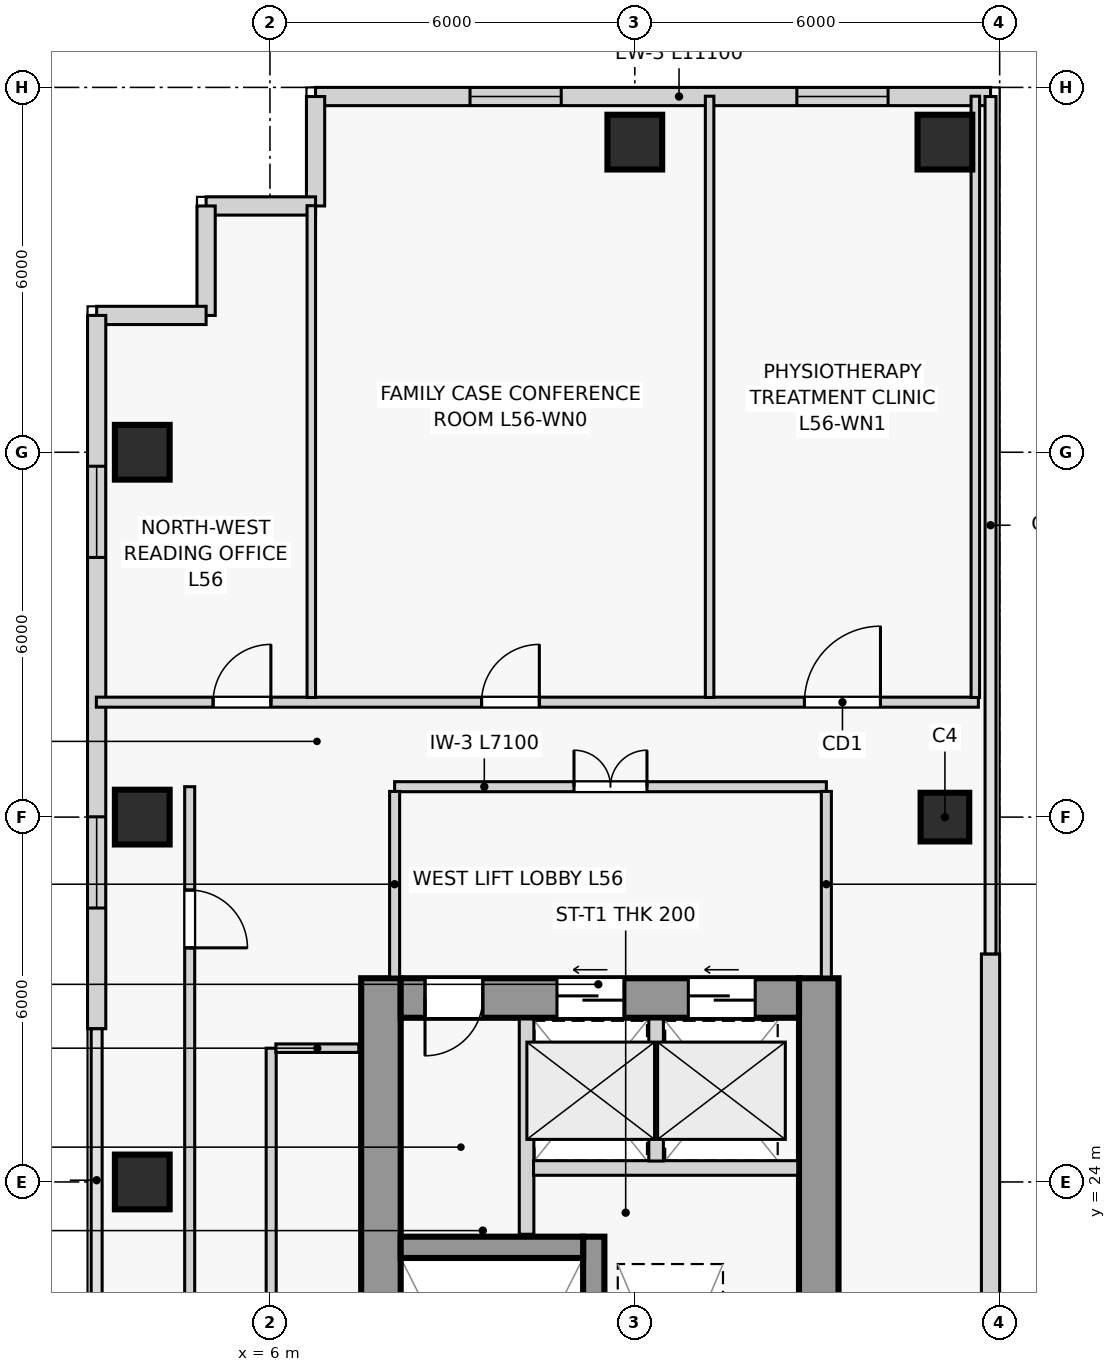
"""IFC4 building model, lengths in metres.
Left out: names, types, materials, properties, quantities, classifications, styles, units other than length and angle.
Written with IfcOpenShell. Run it as: python <this file> out.ifc"""

import sys

from ifc_helpers import new_model, si_unit, direction, frame, frame_2d, origin, origin_2d, place, context, subcontext, project, spatial, rectangle, extrude, source, transform, mapped, element, fill, save


model = new_model("IFC4")
c1 = context("Model", 3, precision=1e-05, world=origin(), true_north=direction((0.0, 1.0)))
c2 = subcontext(c1, "Body", "Model", "MODEL_VIEW")
j1 = project(units=[si_unit("LENGTHUNIT", "METRE"), si_unit("PLANEANGLEUNIT", "RADIAN")], contexts=[c1])
p1 = place(None, origin())
s1 = spatial("IfcSite", under=j1, at=p1, CompositionType="ELEMENT")
p2 = place(p1, origin())
s2 = spatial("IfcBuilding", under=s1, at=p2, CompositionType="ELEMENT")
p3 = place(p2, frame((0.0, 0.0, 213.3)))
s3 = spatial("IfcBuildingStorey", under=s2, at=p3, CompositionType="ELEMENT", Elevation=213.3)
p4 = place(p3, frame((7.825, 14.7, 0.0), z_axis=(0.0, 0.0, 1.0), x_axis=(0.0, 1.0, 0.0)))
e1 = element("IfcWall", 1, at=p4, inside=s3, PredefinedType="SHEAR", context=c2, shape_type="SweptSolid", body=[
    extrude(rectangle(XDim=12.65, YDim=0.65, at=frame_2d((6.325, 0.0))), origin(), (0.0, 0.0, 1.0), 3.6),
])
p5 = place(p3, frame((15.025, 14.7, 0.0), z_axis=(0.0, 0.0, 1.0), x_axis=(0.0, 1.0, 0.0)))
e2 = element("IfcWall", 2, at=p5, inside=s3, PredefinedType="SHEAR", context=c2, shape_type="SweptSolid", body=[
    extrude(rectangle(XDim=12.65, YDim=0.65, at=frame_2d((6.325, 0.0))), origin(), (0.0, 0.0, 1.0), 3.6),
])
p6 = place(p5, frame((5.4, 0.0, 0.0)))
e3 = element("IfcOpeningElement", 3, at=p6, cuts=e2, PredefinedType="OPENING", context=c2, shape_type="SweptSolid", body=[
    extrude(rectangle(XDim=1.1, YDim=2.2, at=frame_2d((0.55, 1.1))), frame((0.0, 0.335, 0.0), z_axis=(0.0, -1.0, 0.0), x_axis=(1.0, 0.0, 0.0)), (0.0, 0.0, 1.0), 0.67),
])
p7 = place(p3, frame((8.15, 27.025, 0.0), z_axis=(0.0, 0.0, 1.0), x_axis=(1.0, 0.0, 0.0)))
e4 = element("IfcWall", 4, at=p7, inside=s3, PredefinedType="SHEAR", context=c2, shape_type="SweptSolid", body=[
    extrude(rectangle(XDim=6.55, YDim=0.65, at=frame_2d((3.275, 0.0))), origin(), (0.0, 0.0, 1.0), 3.6),
])
p8 = place(p7, frame((0.4, 0.0, 0.0)))
e5 = element("IfcOpeningElement", 5, at=p8, cuts=e4, PredefinedType="OPENING", context=c2, shape_type="SweptSolid", body=[
    extrude(rectangle(XDim=0.95, YDim=2.1, at=frame_2d((0.475, 1.05))), frame((0.0, 0.335, 0.0), z_axis=(0.0, -1.0, 0.0), x_axis=(1.0, 0.0, 0.0)), (0.0, 0.0, 1.0), 0.67),
])
p9 = place(p7, frame((2.57, 0.0, 0.0)))
e6 = element("IfcOpeningElement", 6, at=p9, cuts=e4, PredefinedType="OPENING", context=c2, shape_type="SweptSolid", body=[
    extrude(rectangle(XDim=1.1, YDim=2.2, at=frame_2d((0.55, 1.1))), frame((0.0, 0.335, 0.0), z_axis=(0.0, -1.0, 0.0), x_axis=(1.0, 0.0, 0.0)), (0.0, 0.0, 1.0), 0.67),
])
p10 = place(p7, frame((4.73, 0.0, 0.0)))
e7 = element("IfcOpeningElement", 7, at=p10, cuts=e4, PredefinedType="OPENING", context=c2, shape_type="SweptSolid", body=[
    extrude(rectangle(XDim=1.1, YDim=2.2, at=frame_2d((0.55, 1.1))), frame((0.0, 0.335, 0.0), z_axis=(0.0, -1.0, 0.0), x_axis=(1.0, 0.0, 0.0)), (0.0, 0.0, 1.0), 0.67),
])
p11 = place(p3, frame((11.325, 15.35, 0.0), z_axis=(0.0, 0.0, 1.0), x_axis=(0.0, 1.0, 0.0)))
e8 = element("IfcWall", 8, at=p11, inside=s3, PredefinedType="SHEAR", context=c2, shape_type="SweptSolid", body=[
    extrude(rectangle(XDim=7.75, YDim=0.35, at=frame_2d((3.875, 0.0))), origin(), (0.0, 0.0, 1.0), 3.6),
])
p12 = place(p3, frame((8.15, 22.925, 0.0), z_axis=(0.0, 0.0, 1.0), x_axis=(1.0, 0.0, 0.0)))
e9 = element("IfcWall", 9, at=p12, inside=s3, PredefinedType="SHEAR", context=c2, shape_type="SweptSolid", body=[
    extrude(rectangle(XDim=3.0, YDim=0.35, at=frame_2d((1.5, 0.0))), origin(), (0.0, 0.0, 1.0), 3.6),
])
m1 = source(origin(), c2, "Body", "SweptSolid", [
    extrude(rectangle(XDim=0.9, YDim=0.9, at=origin_2d()), origin(), (0.0, 0.0, 1.0), 3.6),
])
for number, where, z_axis, x_axis in (
    (10, (12.0, 41.1, 0.0), (0.0, 0.0, 1.0), (1.0, 0.0, 0.0)),
    (11, (17.1, 41.1, 0.0), (0.0, 0.0, 1.0), (1.0, 0.0, 0.0)),
    (12, (3.9, 24.0, 0.0), (0.0, 0.0, 1.0), (1.0, 0.0, 0.0)),
    (13, (3.9, 30.0, 0.0), (0.0, 0.0, 1.0), (1.0, 0.0, 0.0)),
    (14, (3.9, 36.0, 0.0), (0.0, 0.0, 1.0), (1.0, 0.0, 0.0)),
):
    element("IfcColumn", number, at=place(p3, frame(where, z_axis=z_axis, x_axis=x_axis)), inside=s3, PredefinedType="COLUMN", context=c2, shape_type="MappedRepresentation", body=[
        mapped(m1, transform((0.0, 0.0, 0.0), scale=1.0)),
    ])
m2 = source(origin(), c2, "Body", "SweptSolid", [
    extrude(rectangle(XDim=0.8, YDim=0.8, at=origin_2d()), origin(), (0.0, 0.0, 1.0), 3.6),
])
p13 = place(p3, frame((17.1, 30.0, 0.0), z_axis=(0.0, 0.0, 1.0), x_axis=(1.0, 0.0, 0.0)))
e15 = element("IfcColumn", 15, at=p13, inside=s3, PredefinedType="COLUMN", context=c2, shape_type="MappedRepresentation", body=[
    mapped(m2, transform((0.0, 0.0, 0.0), scale=1.0)),
])
p14 = place(p3, frame((17.85, 14.25, 0.0), z_axis=(0.0, 0.0, 1.0), x_axis=(0.0, 1.0, 0.0)))
e16 = element("IfcWall", 16, at=p14, inside=s3, PredefinedType="SOLIDWALL", context=c2, shape_type="SweptSolid", body=[
    extrude(rectangle(XDim=13.5, YDim=0.3, at=frame_2d((6.75, 0.0))), origin(), (0.0, 0.0, 1.0), 2.95),
])
p15 = place(p3, frame((17.85, 41.85, 0.0), z_axis=(0.0, 0.0, 1.0), x_axis=(-1.0, 0.0, 0.0)))
e17 = element("IfcWall", 17, at=p15, inside=s3, PredefinedType="SOLIDWALL", context=c2, shape_type="SweptSolid", body=[
    extrude(rectangle(XDim=11.1, YDim=0.3, at=frame_2d((5.55, 0.0))), origin(), (0.0, 0.0, 1.0), 2.95),
])
p16 = place(p15, frame((1.685, 0.0, 0.85)))
e18 = element("IfcOpeningElement", 18, at=p16, cuts=e17, PredefinedType="OPENING", context=c2, shape_type="SweptSolid", body=[
    extrude(rectangle(XDim=1.5, YDim=1.8, at=frame_2d((0.75, 0.9))), frame((0.0, 0.16, 0.0), z_axis=(0.0, -1.0, 0.0), x_axis=(1.0, 0.0, 0.0)), (0.0, 0.0, 1.0), 0.32),
])
p17 = place(p15, frame((7.06, 0.0, 0.85)))
e19 = element("IfcOpeningElement", 19, at=p17, cuts=e17, PredefinedType="OPENING", context=c2, shape_type="SweptSolid", body=[
    extrude(rectangle(XDim=1.5, YDim=1.8, at=frame_2d((0.75, 0.9))), frame((0.0, 0.16, 0.0), z_axis=(0.0, -1.0, 0.0), x_axis=(1.0, 0.0, 0.0)), (0.0, 0.0, 1.0), 0.32),
])
for number, where, z_axis, x_axis in (
    (20, (6.75, 41.85, 0.0), (0.0, 0.0, 1.0), (0.0, -1.0, 0.0)),
    (21, (6.75, 40.05, 0.0), (0.0, 0.0, 1.0), (-1.0, 0.0, 0.0)),
    (22, (4.95, 40.05, 0.0), (0.0, 0.0, 1.0), (0.0, -1.0, 0.0)),
    (23, (4.95, 38.25, 0.0), (0.0, 0.0, 1.0), (-1.0, 0.0, 0.0)),
):
    element("IfcWall", number, at=place(p3, frame(where, z_axis=z_axis, x_axis=x_axis)), inside=s3, PredefinedType="SOLIDWALL", context=c2, shape_type="SweptSolid", body=[
        extrude(rectangle(XDim=1.8, YDim=0.3, at=frame_2d((0.9, 0.0))), origin(), (0.0, 0.0, 1.0), 2.95),
    ])
p18 = place(p3, frame((3.15, 38.25, 0.0), z_axis=(0.0, 0.0, 1.0), x_axis=(0.0, -1.0, 0.0)))
e24 = element("IfcWall", 24, at=p18, inside=s3, PredefinedType="SOLIDWALL", context=c2, shape_type="SweptSolid", body=[
    extrude(rectangle(XDim=11.73, YDim=0.3, at=frame_2d((5.865, 0.0))), origin(), (0.0, 0.0, 1.0), 2.95),
])
p19 = place(p18, frame((2.48, 0.0, 0.85)))
e25 = element("IfcOpeningElement", 25, at=p19, cuts=e24, PredefinedType="OPENING", context=c2, shape_type="SweptSolid", body=[
    extrude(rectangle(XDim=1.5, YDim=1.8, at=frame_2d((0.75, 0.9))), frame((0.0, 0.16, 0.0), z_axis=(0.0, -1.0, 0.0), x_axis=(1.0, 0.0, 0.0)), (0.0, 0.0, 1.0), 0.32),
])
p20 = place(p18, frame((8.245, 0.0, 0.85)))
e26 = element("IfcOpeningElement", 26, at=p20, cuts=e24, PredefinedType="OPENING", context=c2, shape_type="SweptSolid", body=[
    extrude(rectangle(XDim=1.5, YDim=1.8, at=frame_2d((0.75, 0.9))), frame((0.0, 0.16, 0.0), z_axis=(0.0, -1.0, 0.0), x_axis=(1.0, 0.0, 0.0)), (0.0, 0.0, 1.0), 0.32),
])
p21 = place(p3, frame((10.22, 23.14, 0.0), z_axis=(0.0, 0.0, 1.0), x_axis=(0.0, 1.0, 0.0)))
e27 = element("IfcWall", 27, at=p21, inside=s3, PredefinedType="PARTITIONING", context=c2, shape_type="SweptSolid", body=[
    extrude(rectangle(XDim=3.54, YDim=0.24, at=frame_2d((1.77, 0.0))), origin(), (0.0, 0.0, 1.0), 2.95),
])
p22 = place(p3, frame((10.335, 24.23, 0.0), z_axis=(0.0, 0.0, 1.0), x_axis=(1.0, 0.0, 0.0)))
e28 = element("IfcWall", 28, at=p22, inside=s3, PredefinedType="PARTITIONING", context=c2, shape_type="SweptSolid", body=[
    extrude(rectangle(XDim=4.345, YDim=0.24, at=frame_2d((2.172, 0.0))), origin(), (0.0, 0.0, 1.0), 2.95),
])
p23 = place(p3, frame((12.35, 24.345, 0.0), z_axis=(0.0, 0.0, 1.0), x_axis=(0.0, 1.0, 0.0)))
e29 = element("IfcWall", 29, at=p23, inside=s3, PredefinedType="PARTITIONING", context=c2, shape_type="SweptSolid", body=[
    extrude(rectangle(XDim=2.335, YDim=0.24, at=frame_2d((1.167, 0.0))), origin(), (0.0, 0.0, 1.0), 2.95),
])
p24 = place(p3, frame((8.05, 30.5, 0.0), z_axis=(0.0, 0.0, 1.0), x_axis=(1.0, 0.0, 0.0)))
e30 = element("IfcWall", 30, at=p24, inside=s3, PredefinedType="PARTITIONING", context=c2, shape_type="SweptSolid", body=[
    extrude(rectangle(XDim=7.1, YDim=0.165, at=frame_2d((3.55, 0.0))), origin(), (0.0, 0.0, 1.0), 2.95),
])
p25 = place(p24, frame((2.95, 0.0, 0.0)))
e31 = element("IfcOpeningElement", 31, at=p25, cuts=e30, PredefinedType="OPENING", context=c2, shape_type="SweptSolid", body=[
    extrude(rectangle(XDim=1.2, YDim=2.2, at=frame_2d((0.6, 1.1))), frame((0.0, 0.093, 0.0), z_axis=(0.0, -1.0, 0.0), x_axis=(1.0, 0.0, 0.0)), (0.0, 0.0, 1.0), 0.185),
])
for number, where, z_axis, x_axis in (
    (32, (8.05, 27.37, 0.0), (0.0, 0.0, 1.0), (0.0, 1.0, 0.0)),
    (33, (15.15, 27.37, 0.0), (0.0, 0.0, 1.0), (0.0, 1.0, 0.0)),
):
    element("IfcWall", number, at=place(p3, frame(where, z_axis=z_axis, x_axis=x_axis)), inside=s3, PredefinedType="PARTITIONING", context=c2, shape_type="SweptSolid", body=[
        extrude(rectangle(XDim=3.052, YDim=0.165, at=frame_2d((1.526, 0.0))), origin(), (0.0, 0.0, 1.0), 2.95),
    ])
p26 = place(p3, frame((6.02, 15.4, 0.0), z_axis=(0.0, 0.0, 1.0), x_axis=(0.0, 1.0, 0.0)))
e34 = element("IfcWall", 34, at=p26, inside=s3, PredefinedType="PARTITIONING", context=c2, shape_type="SweptSolid", body=[
    extrude(rectangle(XDim=10.8, YDim=0.165, at=frame_2d((5.4, 0.0))), origin(), (0.0, 0.0, 1.0), 2.95),
])
p27 = place(p26, frame((4.95, 0.0, 0.0)))
e35 = element("IfcOpeningElement", 35, at=p27, cuts=e34, PredefinedType="OPENING", context=c2, shape_type="SweptSolid", body=[
    extrude(rectangle(XDim=0.9, YDim=2.1, at=frame_2d((0.45, 1.05))), frame((0.0, 0.093, 0.0), z_axis=(0.0, -1.0, 0.0), x_axis=(1.0, 0.0, 0.0)), (0.0, 0.0, 1.0), 0.185),
])
p28 = place(p3, frame((6.097, 26.2, 0.0), z_axis=(0.0, 0.0, 1.0), x_axis=(1.0, 0.0, 0.0)))
e36 = element("IfcWall", 36, at=p28, inside=s3, PredefinedType="PARTITIONING", context=c2, shape_type="SweptSolid", body=[
    extrude(rectangle(XDim=1.363, YDim=0.14, at=frame_2d((0.681, 0.0))), origin(), (0.0, 0.0, 1.0), 2.95),
])
p29 = place(p3, frame((3.145, 31.89, 0.0), z_axis=(0.0, 0.0, 1.0), x_axis=(1.0, 0.0, 0.0)))
e37 = element("IfcWall", 37, at=p29, inside=s3, PredefinedType="PARTITIONING", context=c2, shape_type="SweptSolid", body=[
    extrude(rectangle(XDim=14.505, YDim=0.165, at=frame_2d((7.252, 0.0))), origin(), (0.0, 0.0, 1.0), 2.95),
])
p30 = place(p29, frame((6.335, 0.0, 0.0)))
e38 = element("IfcOpeningElement", 38, at=p30, cuts=e37, PredefinedType="OPENING", context=c2, shape_type="SweptSolid", body=[
    extrude(rectangle(XDim=0.95, YDim=2.1, at=frame_2d((0.475, 1.05))), frame((0.0, 0.093, 0.0), z_axis=(0.0, -1.0, 0.0), x_axis=(1.0, 0.0, 0.0)), (0.0, 0.0, 1.0), 0.185),
])
p31 = place(p29, frame((11.645, 0.0, 0.0)))
e39 = element("IfcOpeningElement", 39, at=p31, cuts=e37, PredefinedType="OPENING", context=c2, shape_type="SweptSolid", body=[
    extrude(rectangle(XDim=1.25, YDim=2.2, at=frame_2d((0.625, 1.1))), frame((0.0, 0.093, 0.0), z_axis=(0.0, -1.0, 0.0), x_axis=(1.0, 0.0, 0.0)), (0.0, 0.0, 1.0), 0.185),
])
p32 = place(p29, frame((1.92, 0.0, 0.0)))
e40 = element("IfcOpeningElement", 40, at=p32, cuts=e37, PredefinedType="OPENING", context=c2, shape_type="SweptSolid", body=[
    extrude(rectangle(XDim=0.95, YDim=2.1, at=frame_2d((0.475, 1.05))), frame((0.0, 0.093, 0.0), z_axis=(0.0, -1.0, 0.0), x_axis=(1.0, 0.0, 0.0)), (0.0, 0.0, 1.0), 0.185),
])
p33 = place(p3, frame((4.68, 11.35, 0.0), z_axis=(0.0, 0.0, 1.0), x_axis=(0.0, 1.0, 0.0)))
e41 = element("IfcWall", 41, at=p33, inside=s3, PredefinedType="PARTITIONING", context=c2, shape_type="SweptSolid", body=[
    extrude(rectangle(XDim=19.15, YDim=0.165, at=frame_2d((9.575, 0.0))), origin(), (0.0, 0.0, 1.0), 2.95),
])
p34 = place(p33, frame((1.6, 0.0, 0.0)))
e42 = element("IfcOpeningElement", 42, at=p34, cuts=e41, PredefinedType="OPENING", context=c2, shape_type="SweptSolid", body=[
    extrude(rectangle(XDim=0.95, YDim=2.1, at=frame_2d((0.475, 1.05))), frame((0.0, 0.093, 0.0), z_axis=(0.0, -1.0, 0.0), x_axis=(1.0, 0.0, 0.0)), (0.0, 0.0, 1.0), 0.185),
])
p35 = place(p33, frame((16.5, 0.0, 0.0)))
e43 = element("IfcOpeningElement", 43, at=p35, cuts=e41, PredefinedType="OPENING", context=c2, shape_type="SweptSolid", body=[
    extrude(rectangle(XDim=0.95, YDim=2.1, at=frame_2d((0.475, 1.05))), frame((0.0, 0.093, 0.0), z_axis=(0.0, -1.0, 0.0), x_axis=(1.0, 0.0, 0.0)), (0.0, 0.0, 1.0), 0.185),
])
p36 = place(p3, frame((6.68, 31.968, 0.0), z_axis=(0.0, 0.0, 1.0), x_axis=(0.0, 1.0, 0.0)))
e44 = element("IfcWall", 44, at=p36, inside=s3, PredefinedType="PARTITIONING", context=c2, shape_type="SweptSolid", body=[
    extrude(rectangle(XDim=8.087, YDim=0.14, at=frame_2d((4.044, 0.0))), origin(), (0.0, 0.0, 1.0), 2.95),
])
for number, where, z_axis, x_axis in (
    (45, (13.23, 31.968, 0.0), (0.0, 0.0, 1.0), (0.0, 1.0, 0.0)),
    (46, (17.6, 31.968, 0.0), (0.0, 0.0, 1.0), (0.0, 1.0, 0.0)),
):
    element("IfcWall", number, at=place(p3, frame(where, z_axis=z_axis, x_axis=x_axis)), inside=s3, PredefinedType="PARTITIONING", context=c2, shape_type="SweptSolid", body=[
        extrude(rectangle(XDim=9.887, YDim=0.14, at=frame_2d((4.944, 0.0))), origin(), (0.0, 0.0, 1.0), 2.95),
    ])
m3 = source(origin(), c2, "Body", "SweptSolid", [
    extrude(rectangle(XDim=1.5, YDim=1.8, at=frame_2d((0.75, 0.9))), frame((0.0, 0.03, 0.0), z_axis=(0.0, -1.0, 0.0), x_axis=(1.0, 0.0, 0.0)), (0.0, 0.0, 1.0), 0.06),
])
p37 = place(p16, origin())
e47 = element("IfcWindow", 47, at=p37, inside=s3, PartitioningType="SINGLE_PANEL", PredefinedType="WINDOW", context=c2, shape_type="MappedRepresentation", body=[
    mapped(m3, transform((0.0, 0.0, 0.0), scale=1.0)),
])
fill(e18, e47)
p38 = place(p17, origin())
e48 = element("IfcWindow", 48, at=p38, inside=s3, PartitioningType="SINGLE_PANEL", PredefinedType="WINDOW", context=c2, shape_type="MappedRepresentation", body=[
    mapped(m3, transform((0.0, 0.0, 0.0), scale=1.0)),
])
fill(e19, e48)
p39 = place(p19, origin())
e49 = element("IfcWindow", 49, at=p39, inside=s3, PartitioningType="SINGLE_PANEL", PredefinedType="WINDOW", context=c2, shape_type="MappedRepresentation", body=[
    mapped(m3, transform((0.0, 0.0, 0.0), scale=1.0)),
])
fill(e25, e49)
p40 = place(p20, origin())
e50 = element("IfcWindow", 50, at=p40, inside=s3, PartitioningType="SINGLE_PANEL", PredefinedType="WINDOW", context=c2, shape_type="MappedRepresentation", body=[
    mapped(m3, transform((0.0, 0.0, 0.0), scale=1.0)),
])
fill(e26, e50)
m4 = source(origin(), c2, "Body", "SweptSolid", [
    extrude(rectangle(XDim=0.95, YDim=2.1, at=frame_2d((0.475, 1.05))), frame((0.0, 0.025, 0.0), z_axis=(0.0, -1.0, 0.0), x_axis=(1.0, 0.0, 0.0)), (0.0, 0.0, 1.0), 0.05),
])
p41 = place(p8, frame((0.95, 0.0, 0.0), z_axis=(0.0, 0.0, 1.0), x_axis=(-1.0, 0.0, 0.0)))
e51 = element("IfcDoor", 51, at=p41, inside=s3, OperationType="SINGLE_SWING_RIGHT", PredefinedType="DOOR", context=c2, shape_type="MappedRepresentation", body=[
    mapped(m4, transform((0.0, 0.0, 0.0), scale=1.0)),
])
fill(e5, e51)
m5 = source(origin(), c2, "Body", "SweptSolid", [
    extrude(rectangle(XDim=1.1, YDim=2.2, at=frame_2d((0.55, 1.1))), frame((0.0, 0.025, 0.0), z_axis=(0.0, -1.0, 0.0), x_axis=(1.0, 0.0, 0.0)), (0.0, 0.0, 1.0), 0.05),
])
p42 = place(p9, origin())
e52 = element("IfcDoor", 52, at=p42, inside=s3, OperationType="SLIDING_TO_LEFT", PredefinedType="DOOR", context=c2, shape_type="MappedRepresentation", body=[
    mapped(m5, transform((0.0, 0.0, 0.0), scale=1.0)),
])
fill(e6, e52)
p43 = place(p10, origin())
e53 = element("IfcDoor", 53, at=p43, inside=s3, OperationType="SLIDING_TO_LEFT", PredefinedType="DOOR", context=c2, shape_type="MappedRepresentation", body=[
    mapped(m5, transform((0.0, 0.0, 0.0), scale=1.0)),
])
fill(e7, e53)
m6 = source(origin(), c2, "Body", "SweptSolid", [
    extrude(rectangle(XDim=1.2, YDim=2.2, at=frame_2d((0.6, 1.1))), frame((0.0, 0.025, 0.0), z_axis=(0.0, -1.0, 0.0), x_axis=(1.0, 0.0, 0.0)), (0.0, 0.0, 1.0), 0.05),
])
p44 = place(p25, origin())
e54 = element("IfcDoor", 54, at=p44, inside=s3, OperationType="DOUBLE_DOOR_SINGLE_SWING", PredefinedType="DOOR", context=c2, shape_type="MappedRepresentation", body=[
    mapped(m6, transform((0.0, 0.0, 0.0), scale=1.0)),
])
fill(e31, e54)
p45 = place(p35, frame((0.95, 0.0, 0.0), z_axis=(0.0, 0.0, 1.0), x_axis=(-1.0, 0.0, 0.0)))
e55 = element("IfcDoor", 55, at=p45, inside=s3, OperationType="SINGLE_SWING_RIGHT", PredefinedType="DOOR", context=c2, shape_type="MappedRepresentation", body=[
    mapped(m4, transform((0.0, 0.0, 0.0), scale=1.0)),
])
fill(e43, e55)
p46 = place(p30, origin())
e56 = element("IfcDoor", 56, at=p46, inside=s3, OperationType="SINGLE_SWING_RIGHT", PredefinedType="DOOR", context=c2, shape_type="MappedRepresentation", body=[
    mapped(m4, transform((0.0, 0.0, 0.0), scale=1.0)),
])
fill(e38, e56)
m7 = source(origin(), c2, "Body", "SweptSolid", [
    extrude(rectangle(XDim=1.25, YDim=2.2, at=frame_2d((0.625, 1.1))), frame((0.0, 0.025, 0.0), z_axis=(0.0, -1.0, 0.0), x_axis=(1.0, 0.0, 0.0)), (0.0, 0.0, 1.0), 0.05),
])
p47 = place(p31, origin())
e57 = element("IfcDoor", 57, at=p47, inside=s3, OperationType="SINGLE_SWING_RIGHT", PredefinedType="DOOR", context=c2, shape_type="MappedRepresentation", body=[
    mapped(m7, transform((0.0, 0.0, 0.0), scale=1.0)),
])
fill(e39, e57)
p48 = place(p32, origin())
e58 = element("IfcDoor", 58, at=p48, inside=s3, OperationType="SINGLE_SWING_RIGHT", PredefinedType="DOOR", context=c2, shape_type="MappedRepresentation", body=[
    mapped(m4, transform((0.0, 0.0, 0.0), scale=1.0)),
])
fill(e40, e58)
save(model, sys.argv[1])
